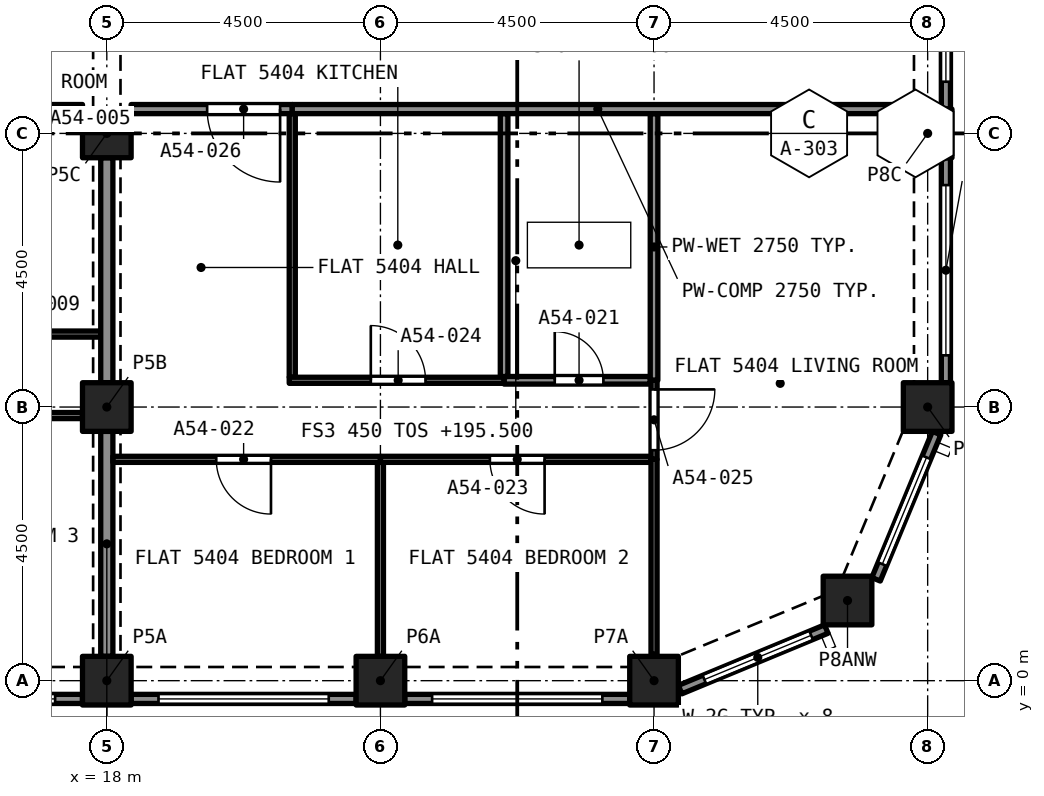
"""IFC4 building model, lengths in metres.
Left out: names, types, materials, properties, quantities, classifications, styles, units other than length and angle.
Written with IfcOpenShell. Run it as: python <this file> out.ifc"""

import sys

from ifc_helpers import new_model, si_unit, direction, frame, frame_2d, origin, origin_2d, place, context, subcontext, project, spatial, rectangle, extrude, element, fill, save


model = new_model("IFC4")
c1 = context("Model", 3, precision=1e-05, world=origin(), true_north=direction((0.0, 1.0)))
c2 = subcontext(c1, "Body", "Model", "MODEL_VIEW")
j1 = project(units=[si_unit("LENGTHUNIT", "METRE"), si_unit("PLANEANGLEUNIT", "RADIAN")], contexts=[c1])
p1 = place(None, origin())
s1 = spatial("IfcSite", under=j1, at=p1, CompositionType="ELEMENT")
p2 = place(p1, origin())
s2 = spatial("IfcBuilding", under=s1, at=p2, CompositionType="ELEMENT")
p3 = place(p2, frame((0.0, 0.0, 195.5)))
s3 = spatial("IfcBuildingStorey", under=s2, at=p3, CompositionType="ELEMENT", Elevation=195.5)
for number, where, z_axis, x_axis in (
    (1, (18.0, 0.0, 0.0), (0.0, 0.0, 1.0), (1.0, 0.0, 0.0)),
    (2, (22.5, 0.0, 0.0), (0.0, 0.0, 1.0), (1.0, 0.0, 0.0)),
    (3, (27.0, 0.0, 0.0), (0.0, 0.0, 1.0), (1.0, 0.0, 0.0)),
    (4, (30.182, 1.318, 0.0), (0.0, 0.0, 1.0), (1.0, 0.0, 0.0)),
    (5, (18.0, 4.5, 0.0), (0.0, 0.0, 1.0), (1.0, 0.0, 0.0)),
    (6, (31.5, 4.5, 0.0), (0.0, 0.0, 1.0), (1.0, 0.0, 0.0)),
    (7, (18.0, 9.0, 0.0), (0.0, 0.0, 1.0), (1.0, 0.0, 0.0)),
    (8, (31.5, 9.0, 0.0), (0.0, 0.0, 1.0), (1.0, 0.0, 0.0)),
):
    element("IfcColumn", number, at=place(p3, frame(where, z_axis=z_axis, x_axis=x_axis)), inside=s3, PredefinedType="COLUMN", context=c2, shape_type="SweptSolid", body=[
        extrude(rectangle(XDim=0.8, YDim=0.8, at=origin_2d()), origin(), (0.0, 0.0, 1.0), 3.2),
    ])
p4 = place(p3, frame((29.833, 0.849, 0.0), z_axis=(0.0, 0.0, 1.0), x_axis=(-0.923885342263, -0.382669406082, 0.0)))
e9 = element("IfcWall", 9, at=p4, inside=s3, PredefinedType="SOLIDWALL", context=c2, shape_type="SweptSolid", body=[
    extrude(rectangle(XDim=2.602, YDim=0.15, at=frame_2d((1.301, 0.0))), origin(), (0.0, 0.0, 1.0), 3.2),
])
p5 = place(p4, frame((0.27, 0.0, 0.45)))
e10 = element("IfcOpeningElement", 10, at=p5, cuts=e9, PredefinedType="OPENING", context=c2, shape_type="SweptSolid", body=[
    extrude(rectangle(XDim=1.9, YDim=1.95, at=frame_2d((0.95, 0.975))), frame((0.0, 0.085, 0.0), z_axis=(0.0, -1.0, 0.0), x_axis=(1.0, 0.0, 0.0)), (0.0, 0.0, 1.0), 0.17),
])
p6 = place(p3, frame((31.647, 4.071, 0.0), z_axis=(0.0, 0.0, 1.0), x_axis=(-0.382669406082, -0.923885342263, 0.0)))
e11 = element("IfcWall", 11, at=p6, inside=s3, PredefinedType="SOLIDWALL", context=c2, shape_type="SweptSolid", body=[
    extrude(rectangle(XDim=2.602, YDim=0.15, at=frame_2d((1.301, 0.0))), origin(), (0.0, 0.0, 1.0), 3.2),
])
p7 = place(p6, frame((0.432, 0.0, 0.45)))
e12 = element("IfcOpeningElement", 12, at=p7, cuts=e11, PredefinedType="OPENING", context=c2, shape_type="SweptSolid", body=[
    extrude(rectangle(XDim=1.9, YDim=1.95, at=frame_2d((0.95, 0.975))), frame((0.0, 0.085, 0.0), z_axis=(0.0, -1.0, 0.0), x_axis=(1.0, 0.0, 0.0)), (0.0, 0.0, 1.0), 0.17),
])
p8 = place(p3, frame((31.8, 8.6, 0.0), z_axis=(0.0, 0.0, 1.0), x_axis=(0.0, -1.0, 0.0)))
e13 = element("IfcWall", 13, at=p8, inside=s3, PredefinedType="SOLIDWALL", context=c2, shape_type="SweptSolid", body=[
    extrude(rectangle(XDim=3.7, YDim=0.15, at=frame_2d((1.85, 0.0))), origin(), (0.0, 0.0, 1.0), 3.2),
])
p9 = place(p8, frame((0.45, 0.0, 0.45)))
e14 = element("IfcOpeningElement", 14, at=p9, cuts=e13, PredefinedType="OPENING", context=c2, shape_type="SweptSolid", body=[
    extrude(rectangle(XDim=2.8, YDim=1.95, at=frame_2d((1.4, 0.975))), frame((0.0, 0.085, 0.0), z_axis=(0.0, -1.0, 0.0), x_axis=(1.0, 0.0, 0.0)), (0.0, 0.0, 1.0), 0.17),
])
p10 = place(p3, frame((31.8, 13.1, 0.0), z_axis=(0.0, 0.0, 1.0), x_axis=(0.0, -1.0, 0.0)))
e15 = element("IfcWall", 15, at=p10, inside=s3, PredefinedType="SOLIDWALL", context=c2, shape_type="SweptSolid", body=[
    extrude(rectangle(XDim=3.7, YDim=0.15, at=frame_2d((1.85, 0.0))), origin(), (0.0, 0.0, 1.0), 3.2),
])
p11 = place(p10, frame((0.45, 0.0, 0.45)))
e16 = element("IfcOpeningElement", 16, at=p11, cuts=e15, PredefinedType="OPENING", context=c2, shape_type="SweptSolid", body=[
    extrude(rectangle(XDim=2.8, YDim=1.95, at=frame_2d((1.4, 0.975))), frame((0.0, 0.085, 0.0), z_axis=(0.0, -1.0, 0.0), x_axis=(1.0, 0.0, 0.0)), (0.0, 0.0, 1.0), 0.17),
])
p12 = place(p3, frame((17.6, -0.3, 0.0), z_axis=(0.0, 0.0, 1.0), x_axis=(-1.0, 0.0, 0.0)))
e17 = element("IfcWall", 17, at=p12, inside=s3, PredefinedType="SOLIDWALL", context=c2, shape_type="SweptSolid", body=[
    extrude(rectangle(XDim=3.7, YDim=0.15, at=frame_2d((1.85, 0.0))), origin(), (0.0, 0.0, 1.0), 3.2),
])
p13 = place(p12, frame((0.45, 0.0, 0.45)))
e18 = element("IfcOpeningElement", 18, at=p13, cuts=e17, PredefinedType="OPENING", context=c2, shape_type="SweptSolid", body=[
    extrude(rectangle(XDim=2.8, YDim=1.95, at=frame_2d((1.4, 0.975))), frame((0.0, 0.085, 0.0), z_axis=(0.0, -1.0, 0.0), x_axis=(1.0, 0.0, 0.0)), (0.0, 0.0, 1.0), 0.17),
])
p14 = place(p3, frame((22.1, -0.3, 0.0), z_axis=(0.0, 0.0, 1.0), x_axis=(-1.0, 0.0, 0.0)))
e19 = element("IfcWall", 19, at=p14, inside=s3, PredefinedType="SOLIDWALL", context=c2, shape_type="SweptSolid", body=[
    extrude(rectangle(XDim=3.7, YDim=0.15, at=frame_2d((1.85, 0.0))), origin(), (0.0, 0.0, 1.0), 3.2),
])
p15 = place(p14, frame((0.45, 0.0, 0.45)))
e20 = element("IfcOpeningElement", 20, at=p15, cuts=e19, PredefinedType="OPENING", context=c2, shape_type="SweptSolid", body=[
    extrude(rectangle(XDim=2.8, YDim=1.95, at=frame_2d((1.4, 0.975))), frame((0.0, 0.085, 0.0), z_axis=(0.0, -1.0, 0.0), x_axis=(1.0, 0.0, 0.0)), (0.0, 0.0, 1.0), 0.17),
])
p16 = place(p3, frame((26.6, -0.3, 0.0), z_axis=(0.0, 0.0, 1.0), x_axis=(-1.0, 0.0, 0.0)))
e21 = element("IfcWall", 21, at=p16, inside=s3, PredefinedType="SOLIDWALL", context=c2, shape_type="SweptSolid", body=[
    extrude(rectangle(XDim=3.7, YDim=0.15, at=frame_2d((1.85, 0.0))), origin(), (0.0, 0.0, 1.0), 3.2),
])
p17 = place(p16, frame((0.45, 0.0, 0.45)))
e22 = element("IfcOpeningElement", 22, at=p17, cuts=e21, PredefinedType="OPENING", context=c2, shape_type="SweptSolid", body=[
    extrude(rectangle(XDim=2.8, YDim=1.95, at=frame_2d((1.4, 0.975))), frame((0.0, 0.085, 0.0), z_axis=(0.0, -1.0, 0.0), x_axis=(1.0, 0.0, 0.0)), (0.0, 0.0, 1.0), 0.17),
])
p18 = place(p3, frame((8.675, 9.4, 0.0), z_axis=(0.0, 0.0, 1.0), x_axis=(1.0, 0.0, 0.0)))
e23 = element("IfcWall", 23, at=p18, inside=s3, PredefinedType="PARTITIONING", context=c2, shape_type="SweptSolid", body=[
    extrude(rectangle(XDim=8.925, YDim=0.15, at=frame_2d((4.462, 0.0))), origin(), (0.0, 0.0, 1.0), 2.9),
])
p19 = place(p3, frame((17.6, 4.36, 0.0), z_axis=(0.0, 0.0, 1.0), x_axis=(-1.0, 0.0, 0.0)))
e24 = element("IfcWall", 24, at=p19, inside=s3, PredefinedType="PARTITIONING", context=c2, shape_type="SweptSolid", body=[
    extrude(rectangle(XDim=4.1, YDim=0.1, at=frame_2d((2.05, 0.0))), origin(), (0.0, 0.0, 1.0), 2.9),
])
p20 = place(p19, frame((1.4, 0.0, 0.0)))
e25 = element("IfcOpeningElement", 25, at=p20, cuts=e24, PredefinedType="OPENING", context=c2, shape_type="SweptSolid", body=[
    extrude(rectangle(XDim=0.9, YDim=2.1, at=frame_2d((0.45, 1.05))), frame((0.0, 0.06, 0.0), z_axis=(0.0, -1.0, 0.0), x_axis=(1.0, 0.0, 0.0)), (0.0, 0.0, 1.0), 0.12),
])
p21 = place(p3, frame((18.0, 0.4, 0.0), z_axis=(0.0, 0.0, 1.0), x_axis=(0.0, 1.0, 0.0)))
e26 = element("IfcWall", 26, at=p21, inside=s3, PredefinedType="PARTITIONING", context=c2, shape_type="SweptSolid", body=[
    extrude(rectangle(XDim=3.7, YDim=0.2, at=frame_2d((1.85, 0.0))), origin(), (0.0, 0.0, 1.0), 2.38),
])
p22 = place(p3, frame((14.808, 5.7, 0.0), z_axis=(0.0, 0.0, 1.0), x_axis=(1.0, 0.0, 0.0)))
e27 = element("IfcWall", 27, at=p22, inside=s3, PredefinedType="PARTITIONING", context=c2, shape_type="SweptSolid", body=[
    extrude(rectangle(XDim=3.092, YDim=0.1, at=frame_2d((1.546, 0.0))), origin(), (0.0, 0.0, 1.0), 2.9),
])
p23 = place(p22, frame((1.146, 0.0, 0.0)))
e28 = element("IfcOpeningElement", 28, at=p23, cuts=e27, PredefinedType="OPENING", context=c2, shape_type="SweptSolid", body=[
    extrude(rectangle(XDim=0.9, YDim=2.1, at=frame_2d((0.45, 1.05))), frame((0.0, 0.06, 0.0), z_axis=(0.0, -1.0, 0.0), x_axis=(1.0, 0.0, 0.0)), (0.0, 0.0, 1.0), 0.12),
])
p24 = place(p3, frame((18.0, 4.9, 0.0), z_axis=(0.0, 0.0, 1.0), x_axis=(0.0, 1.0, 0.0)))
e29 = element("IfcWall", 29, at=p24, inside=s3, PredefinedType="PARTITIONING", context=c2, shape_type="SweptSolid", body=[
    extrude(rectangle(XDim=3.7, YDim=0.2, at=frame_2d((1.85, 0.0))), origin(), (0.0, 0.0, 1.0), 2.38),
])
p25 = place(p3, frame((24.534, 4.94, 0.0), z_axis=(0.0, 0.0, 1.0), x_axis=(1.0, 0.0, 0.0)))
e30 = element("IfcWall", 30, at=p25, inside=s3, PredefinedType="PARTITIONING", context=c2, shape_type="SweptSolid", body=[
    extrude(rectangle(XDim=2.404, YDim=0.125, at=frame_2d((1.202, 0.0))), origin(), (0.0, 0.0, 1.0), 2.75),
])
p26 = place(p25, frame((0.833, 0.0, 0.0)))
e31 = element("IfcOpeningElement", 31, at=p26, cuts=e30, PredefinedType="OPENING", context=c2, shape_type="SweptSolid", body=[
    extrude(rectangle(XDim=0.8, YDim=2.1, at=frame_2d((0.4, 1.05))), frame((0.0, 0.073, 0.0), z_axis=(0.0, -1.0, 0.0), x_axis=(1.0, 0.0, 0.0)), (0.0, 0.0, 1.0), 0.145),
])
p27 = place(p3, frame((24.534, 5.002, 0.0), z_axis=(0.0, 0.0, 1.0), x_axis=(0.0, 1.0, 0.0)))
e32 = element("IfcWall", 32, at=p27, inside=s3, PredefinedType="PARTITIONING", context=c2, shape_type="SweptSolid", body=[
    extrude(rectangle(XDim=4.323, YDim=0.125, at=frame_2d((2.161, 0.0))), origin(), (0.0, 0.0, 1.0), 2.75),
])
p28 = place(p3, frame((27.0, 4.94, 0.0), z_axis=(0.0, 0.0, 1.0), x_axis=(0.0, 1.0, 0.0)))
e33 = element("IfcWall", 33, at=p28, inside=s3, PredefinedType="PARTITIONING", context=c2, shape_type="SweptSolid", body=[
    extrude(rectangle(XDim=4.385, YDim=0.125, at=frame_2d((2.192, 0.0))), origin(), (0.0, 0.0, 1.0), 2.75),
])
p29 = place(p3, frame((22.5, 0.4, 0.0), z_axis=(0.0, 0.0, 1.0), x_axis=(0.0, 1.0, 0.0)))
e34 = element("IfcWall", 34, at=p29, inside=s3, PredefinedType="PARTITIONING", context=c2, shape_type="SweptSolid", body=[
    extrude(rectangle(XDim=3.19, YDim=0.1, at=frame_2d((1.595, 0.0))), origin(), (0.0, 0.0, 1.0), 2.75),
])
p30 = place(p3, frame((22.5, 3.64, 0.0), z_axis=(0.0, 0.0, 1.0), x_axis=(-1.0, 0.0, 0.0)))
e35 = element("IfcWall", 35, at=p30, inside=s3, PredefinedType="PARTITIONING", context=c2, shape_type="SweptSolid", body=[
    extrude(rectangle(XDim=4.4, YDim=0.1, at=frame_2d((2.2, 0.0))), origin(), (0.0, 0.0, 1.0), 2.75),
])
p31 = place(p30, frame((1.8, 0.0, 0.0)))
e36 = element("IfcOpeningElement", 36, at=p31, cuts=e35, PredefinedType="OPENING", context=c2, shape_type="SweptSolid", body=[
    extrude(rectangle(XDim=0.9, YDim=2.1, at=frame_2d((0.45, 1.05))), frame((0.0, 0.06, 0.0), z_axis=(0.0, -1.0, 0.0), x_axis=(1.0, 0.0, 0.0)), (0.0, 0.0, 1.0), 0.12),
])
p32 = place(p3, frame((26.95, 3.64, 0.0), z_axis=(0.0, 0.0, 1.0), x_axis=(-1.0, 0.0, 0.0)))
e37 = element("IfcWall", 37, at=p32, inside=s3, PredefinedType="PARTITIONING", context=c2, shape_type="SweptSolid", body=[
    extrude(rectangle(XDim=4.45, YDim=0.1, at=frame_2d((2.225, 0.0))), origin(), (0.0, 0.0, 1.0), 2.75),
])
p33 = place(p32, frame((1.75, 0.0, 0.0)))
e38 = element("IfcOpeningElement", 38, at=p33, cuts=e37, PredefinedType="OPENING", context=c2, shape_type="SweptSolid", body=[
    extrude(rectangle(XDim=0.9, YDim=2.1, at=frame_2d((0.45, 1.05))), frame((0.0, 0.06, 0.0), z_axis=(0.0, -1.0, 0.0), x_axis=(1.0, 0.0, 0.0)), (0.0, 0.0, 1.0), 0.12),
])
p34 = place(p3, frame((27.0, 0.433, 0.0), z_axis=(0.0, 0.0, 1.0), x_axis=(0.0, 1.0, 0.0)))
e39 = element("IfcWall", 39, at=p34, inside=s3, PredefinedType="PARTITIONING", context=c2, shape_type="SweptSolid", body=[
    extrude(rectangle(XDim=3.207, YDim=0.1, at=frame_2d((1.604, 0.0))), origin(), (0.0, 0.0, 1.0), 2.75),
])
p35 = place(p3, frame((21.05, 4.99, 0.0), z_axis=(0.0, 0.0, 1.0), x_axis=(0.0, 1.0, 0.0)))
e40 = element("IfcWall", 40, at=p35, inside=s3, PredefinedType="PARTITIONING", context=c2, shape_type="SweptSolid", body=[
    extrude(rectangle(XDim=4.335, YDim=0.1, at=frame_2d((2.167, 0.0))), origin(), (0.0, 0.0, 1.0), 2.75),
])
p36 = place(p3, frame((21.0, 4.94, 0.0), z_axis=(0.0, 0.0, 1.0), x_axis=(1.0, 0.0, 0.0)))
e41 = element("IfcWall", 41, at=p36, inside=s3, PredefinedType="PARTITIONING", context=c2, shape_type="SweptSolid", body=[
    extrude(rectangle(XDim=3.534, YDim=0.1, at=frame_2d((1.767, 0.0))), origin(), (0.0, 0.0, 1.0), 2.75),
])
p37 = place(p36, frame((1.342, 0.0, 0.0)))
e42 = element("IfcOpeningElement", 42, at=p37, cuts=e41, PredefinedType="OPENING", context=c2, shape_type="SweptSolid", body=[
    extrude(rectangle(XDim=0.9, YDim=2.1, at=frame_2d((0.45, 1.05))), frame((0.0, 0.06, 0.0), z_axis=(0.0, -1.0, 0.0), x_axis=(1.0, 0.0, 0.0)), (0.0, 0.0, 1.0), 0.12),
])
p38 = place(p3, frame((27.0, 4.94, 0.0), z_axis=(0.0, 0.0, 1.0), x_axis=(0.0, -1.0, 0.0)))
e43 = element("IfcWall", 43, at=p38, inside=s3, PredefinedType="PARTITIONING", context=c2, shape_type="SweptSolid", body=[
    extrude(rectangle(XDim=1.3, YDim=0.1, at=frame_2d((0.65, 0.0))), origin(), (0.0, 0.0, 1.0), 2.75),
])
p39 = place(p38, frame((0.15, 0.0, 0.0)))
e44 = element("IfcOpeningElement", 44, at=p39, cuts=e43, PredefinedType="OPENING", context=c2, shape_type="SweptSolid", body=[
    extrude(rectangle(XDim=1.0, YDim=2.1, at=frame_2d((0.5, 1.05))), frame((0.0, 0.06, 0.0), z_axis=(0.0, -1.0, 0.0), x_axis=(1.0, 0.0, 0.0)), (0.0, 0.0, 1.0), 0.12),
])
p40 = place(p3, frame((21.05, 9.4, 0.0), z_axis=(0.0, 0.0, 1.0), x_axis=(-1.0, 0.0, 0.0)))
e45 = element("IfcWall", 45, at=p40, inside=s3, PredefinedType="PARTITIONING", context=c2, shape_type="SweptSolid", body=[
    extrude(rectangle(XDim=2.65, YDim=0.15, at=frame_2d((1.325, 0.0))), origin(), (0.0, 0.0, 1.0), 2.75),
])
p41 = place(p40, frame((0.2, 0.0, 0.0)))
e46 = element("IfcOpeningElement", 46, at=p41, cuts=e45, PredefinedType="OPENING", context=c2, shape_type="SweptSolid", body=[
    extrude(rectangle(XDim=1.2, YDim=2.4, at=frame_2d((0.6, 1.2))), frame((0.0, 0.085, 0.0), z_axis=(0.0, -1.0, 0.0), x_axis=(1.0, 0.0, 0.0)), (0.0, 0.0, 1.0), 0.17),
])
p42 = place(p3, frame((21.05, 9.4, 0.0), z_axis=(0.0, 0.0, 1.0), x_axis=(1.0, 0.0, 0.0)))
e47 = element("IfcWall", 47, at=p42, inside=s3, PredefinedType="PARTITIONING", context=c2, shape_type="SweptSolid", body=[
    extrude(rectangle(XDim=10.05, YDim=0.15, at=frame_2d((5.025, 0.0))), origin(), (0.0, 0.0, 1.0), 2.75),
])
p43 = place(p5, origin())
e48 = element("IfcWindow", 48, at=p43, inside=s3, PartitioningType="SINGLE_PANEL", PredefinedType="WINDOW", context=c2, shape_type="SweptSolid", body=[
    extrude(rectangle(XDim=1.9, YDim=1.95, at=frame_2d((0.95, 0.975))), frame((0.0, 0.03, 0.0), z_axis=(0.0, -1.0, 0.0), x_axis=(1.0, 0.0, 0.0)), (0.0, 0.0, 1.0), 0.06),
])
fill(e10, e48)
p44 = place(p7, origin())
e49 = element("IfcWindow", 49, at=p44, inside=s3, PartitioningType="SINGLE_PANEL", PredefinedType="WINDOW", context=c2, shape_type="SweptSolid", body=[
    extrude(rectangle(XDim=1.9, YDim=1.95, at=frame_2d((0.95, 0.975))), frame((0.0, 0.03, 0.0), z_axis=(0.0, -1.0, 0.0), x_axis=(1.0, 0.0, 0.0)), (0.0, 0.0, 1.0), 0.06),
])
fill(e12, e49)
p45 = place(p9, origin())
e50 = element("IfcWindow", 50, at=p45, inside=s3, PartitioningType="SINGLE_PANEL", PredefinedType="WINDOW", context=c2, shape_type="SweptSolid", body=[
    extrude(rectangle(XDim=2.8, YDim=1.95, at=frame_2d((1.4, 0.975))), frame((0.0, 0.03, 0.0), z_axis=(0.0, -1.0, 0.0), x_axis=(1.0, 0.0, 0.0)), (0.0, 0.0, 1.0), 0.06),
])
fill(e14, e50)
p46 = place(p11, origin())
e51 = element("IfcWindow", 51, at=p46, inside=s3, PartitioningType="SINGLE_PANEL", PredefinedType="WINDOW", context=c2, shape_type="SweptSolid", body=[
    extrude(rectangle(XDim=2.8, YDim=1.95, at=frame_2d((1.4, 0.975))), frame((0.0, 0.03, 0.0), z_axis=(0.0, -1.0, 0.0), x_axis=(1.0, 0.0, 0.0)), (0.0, 0.0, 1.0), 0.06),
])
fill(e16, e51)
p47 = place(p13, origin())
e52 = element("IfcWindow", 52, at=p47, inside=s3, PartitioningType="SINGLE_PANEL", PredefinedType="WINDOW", context=c2, shape_type="SweptSolid", body=[
    extrude(rectangle(XDim=2.8, YDim=1.95, at=frame_2d((1.4, 0.975))), frame((0.0, 0.03, 0.0), z_axis=(0.0, -1.0, 0.0), x_axis=(1.0, 0.0, 0.0)), (0.0, 0.0, 1.0), 0.06),
])
fill(e18, e52)
p48 = place(p15, origin())
e53 = element("IfcWindow", 53, at=p48, inside=s3, PartitioningType="SINGLE_PANEL", PredefinedType="WINDOW", context=c2, shape_type="SweptSolid", body=[
    extrude(rectangle(XDim=2.8, YDim=1.95, at=frame_2d((1.4, 0.975))), frame((0.0, 0.03, 0.0), z_axis=(0.0, -1.0, 0.0), x_axis=(1.0, 0.0, 0.0)), (0.0, 0.0, 1.0), 0.06),
])
fill(e20, e53)
p49 = place(p17, origin())
e54 = element("IfcWindow", 54, at=p49, inside=s3, PartitioningType="SINGLE_PANEL", PredefinedType="WINDOW", context=c2, shape_type="SweptSolid", body=[
    extrude(rectangle(XDim=2.8, YDim=1.95, at=frame_2d((1.4, 0.975))), frame((0.0, 0.03, 0.0), z_axis=(0.0, -1.0, 0.0), x_axis=(1.0, 0.0, 0.0)), (0.0, 0.0, 1.0), 0.06),
])
fill(e22, e54)
p50 = place(p26, origin())
e55 = element("IfcDoor", 55, at=p50, inside=s3, OperationType="SINGLE_SWING_RIGHT", PredefinedType="DOOR", context=c2, shape_type="SweptSolid", body=[
    extrude(rectangle(XDim=0.8, YDim=2.1, at=frame_2d((0.4, 1.05))), frame((0.0, 0.025, 0.0), z_axis=(0.0, -1.0, 0.0), x_axis=(1.0, 0.0, 0.0)), (0.0, 0.0, 1.0), 0.05),
])
fill(e31, e55)
p51 = place(p31, origin())
e56 = element("IfcDoor", 56, at=p51, inside=s3, OperationType="SINGLE_SWING_RIGHT", PredefinedType="DOOR", context=c2, shape_type="SweptSolid", body=[
    extrude(rectangle(XDim=0.9, YDim=2.1, at=frame_2d((0.45, 1.05))), frame((0.0, 0.025, 0.0), z_axis=(0.0, -1.0, 0.0), x_axis=(1.0, 0.0, 0.0)), (0.0, 0.0, 1.0), 0.05),
])
fill(e36, e56)
p52 = place(p33, origin())
e57 = element("IfcDoor", 57, at=p52, inside=s3, OperationType="SINGLE_SWING_LEFT", PredefinedType="DOOR", context=c2, shape_type="SweptSolid", body=[
    extrude(rectangle(XDim=0.9, YDim=2.1, at=frame_2d((0.45, 1.05))), frame((0.0, 0.025, 0.0), z_axis=(0.0, -1.0, 0.0), x_axis=(1.0, 0.0, 0.0)), (0.0, 0.0, 1.0), 0.05),
])
fill(e38, e57)
p53 = place(p37, origin())
e58 = element("IfcDoor", 58, at=p53, inside=s3, OperationType="SINGLE_SWING_RIGHT", PredefinedType="DOOR", context=c2, shape_type="SweptSolid", body=[
    extrude(rectangle(XDim=0.9, YDim=2.1, at=frame_2d((0.45, 1.05))), frame((0.0, 0.025, 0.0), z_axis=(0.0, -1.0, 0.0), x_axis=(1.0, 0.0, 0.0)), (0.0, 0.0, 1.0), 0.05),
])
fill(e42, e58)
p54 = place(p39, origin())
e59 = element("IfcDoor", 59, at=p54, inside=s3, OperationType="SINGLE_SWING_RIGHT", PredefinedType="DOOR", context=c2, shape_type="SweptSolid", body=[
    extrude(rectangle(XDim=1.0, YDim=2.1, at=frame_2d((0.5, 1.05))), frame((0.0, 0.025, 0.0), z_axis=(0.0, -1.0, 0.0), x_axis=(1.0, 0.0, 0.0)), (0.0, 0.0, 1.0), 0.05),
])
fill(e44, e59)
p55 = place(p41, origin())
e60 = element("IfcDoor", 60, at=p55, inside=s3, OperationType="SINGLE_SWING_LEFT", PredefinedType="DOOR", context=c2, shape_type="SweptSolid", body=[
    extrude(rectangle(XDim=1.2, YDim=2.4, at=frame_2d((0.6, 1.2))), frame((0.0, 0.025, 0.0), z_axis=(0.0, -1.0, 0.0), x_axis=(1.0, 0.0, 0.0)), (0.0, 0.0, 1.0), 0.05),
])
fill(e46, e60)
save(model, sys.argv[1])
